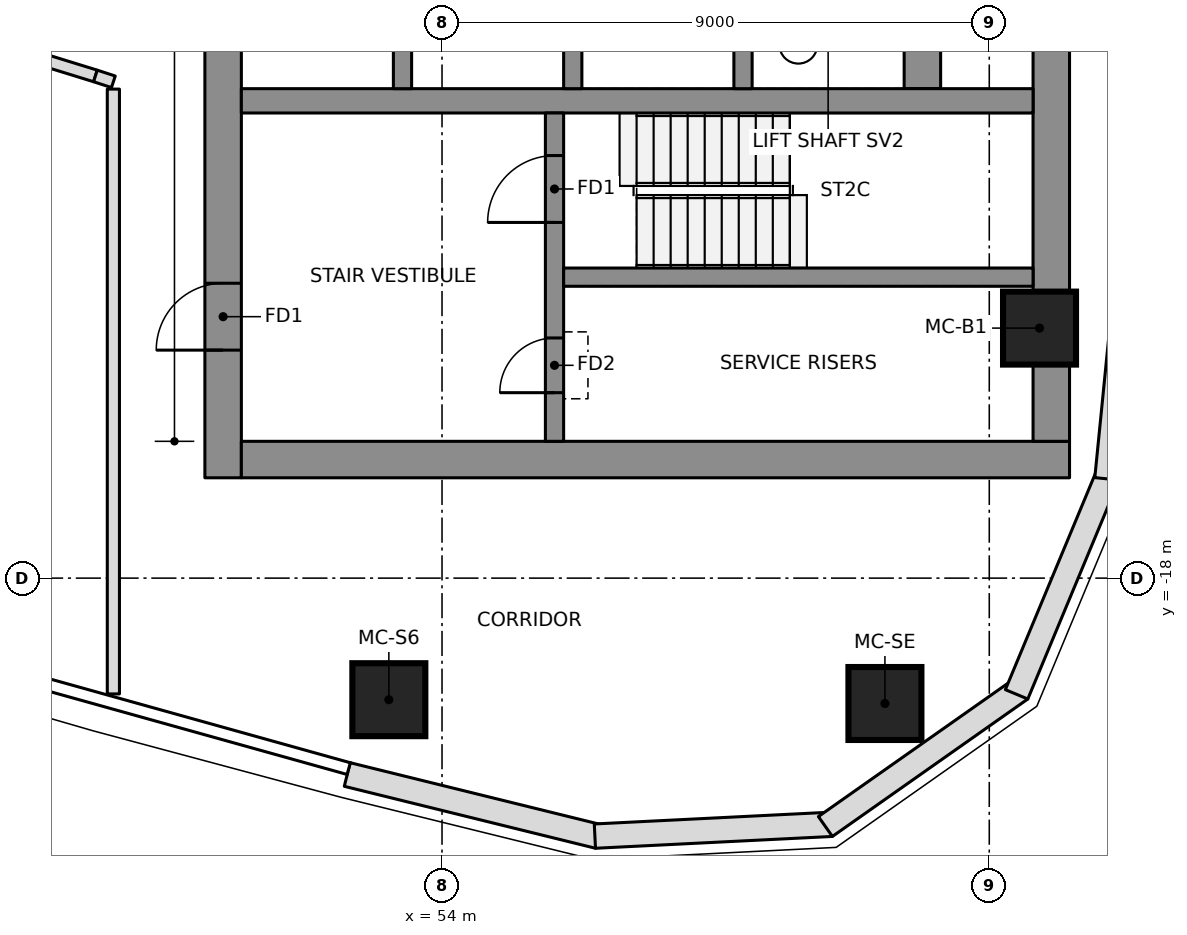
"""IFC4 building model, lengths in metres.
Left out: names, types, materials, properties, quantities, classifications, styles, units other than length and angle.
Written with IfcOpenShell. Run it as: python <this file> out.ifc"""

import sys

from ifc_helpers import new_model, si_unit, direction, frame, frame_2d, origin, origin_2d, place, context, subcontext, project, spatial, polyline, rectangle, outline, extrude, element, fill, save


model = new_model("IFC4")
c1 = context("Model", 3, precision=1e-05, world=origin(), true_north=direction((0.0, 1.0)))
c2 = subcontext(c1, "Body", "Model", "MODEL_VIEW")
j1 = project(units=[si_unit("LENGTHUNIT", "METRE"), si_unit("PLANEANGLEUNIT", "RADIAN")], contexts=[c1])
p1 = place(None, origin())
s1 = spatial("IfcSite", under=j1, at=p1, CompositionType="ELEMENT")
p2 = place(p1, origin())
s2 = spatial("IfcBuilding", under=s1, at=p2, CompositionType="ELEMENT")
p3 = place(p2, frame((0.0, 0.0, 235.0)))
s3 = spatial("IfcBuildingStorey", under=s2, at=p3, CompositionType="ELEMENT", Elevation=235.0)
p4 = place(p3, frame((50.4, -16.35, 0.0), z_axis=(0.0, 0.0, 1.0), x_axis=(0.0, 1.0, 0.0)))
e1 = element("IfcWall", 1, at=p4, inside=s3, PredefinedType="SHEAR", context=c2, shape_type="SweptSolid", body=[
    extrude(rectangle(XDim=9.7, YDim=0.6, at=frame_2d((4.85, 0.0))), origin(), (0.0, 0.0, 1.0), 3.55),
])
p5 = place(p4, frame((2.1, 0.0, 0.0)))
e2 = element("IfcOpeningElement", 2, at=p5, cuts=e1, PredefinedType="OPENING", context=c2, shape_type="SweptSolid", body=[
    extrude(rectangle(XDim=1.1, YDim=2.1, at=frame_2d((0.55, 1.05))), frame((0.0, 0.31, 0.0), z_axis=(0.0, -1.0, 0.0), x_axis=(1.0, 0.0, 0.0)), (0.0, 0.0, 1.0), 0.62),
])
p6 = place(p3, frame((50.7, -16.05, 0.0), z_axis=(0.0, 0.0, 1.0), x_axis=(1.0, 0.0, 0.0)))
e3 = element("IfcWall", 3, at=p6, inside=s3, PredefinedType="SHEAR", context=c2, shape_type="SweptSolid", body=[
    extrude(rectangle(XDim=13.62, YDim=0.6, at=frame_2d((6.81, 0.0))), origin(), (0.0, 0.0, 1.0), 3.55),
])
p7 = place(p3, frame((64.02, -15.75, 0.0), z_axis=(0.0, 0.0, 1.0), x_axis=(0.0, 1.0, 0.0)))
e4 = element("IfcWall", 4, at=p7, inside=s3, PredefinedType="SHEAR", context=c2, shape_type="SweptSolid", body=[
    extrude(rectangle(XDim=8.248, YDim=0.6, at=frame_2d((4.124, 0.0))), origin(), (0.0, 0.0, 1.0), 3.55),
])
p8 = place(p3, frame((61.9, -9.95, 0.0), z_axis=(0.0, 0.0, 1.0), x_axis=(0.0, 1.0, 0.0)))
e5 = element("IfcWall", 5, at=p8, inside=s3, PredefinedType="SHEAR", context=c2, shape_type="SweptSolid", body=[
    extrude(rectangle(XDim=19.9, YDim=0.6, at=frame_2d((9.95, 0.0))), origin(), (0.0, 0.0, 1.0), 3.55),
])
p9 = place(p3, frame((50.7, -10.15, 0.0), z_axis=(0.0, 0.0, 1.0), x_axis=(1.0, 0.0, 0.0)))
e6 = element("IfcWall", 6, at=p9, inside=s3, PredefinedType="SHEAR", context=c2, shape_type="SweptSolid", body=[
    extrude(rectangle(XDim=13.02, YDim=0.4, at=frame_2d((6.51, 0.0))), origin(), (0.0, 0.0, 1.0), 3.55),
])
for number, where, z_axis, x_axis in (
    (7, (53.35, -9.95, 0.0), (0.0, 0.0, 1.0), (0.0, 1.0, 0.0)),
    (8, (56.15, -9.95, 0.0), (0.0, 0.0, 1.0), (0.0, 1.0, 0.0)),
    (9, (58.95, -9.95, 0.0), (0.0, 0.0, 1.0), (0.0, 1.0, 0.0)),
):
    element("IfcWall", number, at=place(p3, frame(where, z_axis=z_axis, x_axis=x_axis)), inside=s3, PredefinedType="SHEAR", context=c2, shape_type="SweptSolid", body=[
        extrude(rectangle(XDim=3.0, YDim=0.3, at=frame_2d((1.5, 0.0))), origin(), (0.0, 0.0, 1.0), 3.55),
    ])
p10 = place(p3, frame((55.85, -15.75, 0.0), z_axis=(0.0, 0.0, 1.0), x_axis=(0.0, 1.0, 0.0)))
e10 = element("IfcWall", 10, at=p10, inside=s3, PredefinedType="SHEAR", context=c2, shape_type="SweptSolid", body=[
    extrude(rectangle(XDim=5.4, YDim=0.3, at=frame_2d((2.7, 0.0))), origin(), (0.0, 0.0, 1.0), 3.55),
])
p11 = place(p10, frame((3.6, 0.0, 0.0)))
e11 = element("IfcOpeningElement", 11, at=p11, cuts=e10, PredefinedType="OPENING", context=c2, shape_type="SweptSolid", body=[
    extrude(rectangle(XDim=1.1, YDim=2.1, at=frame_2d((0.55, 1.05))), frame((0.0, 0.16, 0.0), z_axis=(0.0, -1.0, 0.0), x_axis=(1.0, 0.0, 0.0)), (0.0, 0.0, 1.0), 0.32),
])
p12 = place(p10, frame((0.8, 0.0, 0.0)))
e12 = element("IfcOpeningElement", 12, at=p12, cuts=e10, PredefinedType="OPENING", context=c2, shape_type="SweptSolid", body=[
    extrude(rectangle(XDim=0.9, YDim=2.1, at=frame_2d((0.45, 1.05))), frame((0.0, 0.16, 0.0), z_axis=(0.0, -1.0, 0.0), x_axis=(1.0, 0.0, 0.0)), (0.0, 0.0, 1.0), 0.32),
])
p13 = place(p3, frame((56.0, -13.05, 0.0), z_axis=(0.0, 0.0, 1.0), x_axis=(1.0, 0.0, 0.0)))
e13 = element("IfcWall", 13, at=p13, inside=s3, PredefinedType="SHEAR", context=c2, shape_type="SweptSolid", body=[
    extrude(rectangle(XDim=7.72, YDim=0.3, at=frame_2d((3.86, 0.0))), origin(), (0.0, 0.0, 1.0), 3.55),
])
for number, where, z_axis, x_axis in (
    (14, (53.125, -20.0, 0.0), (0.0, 0.0, 1.0), (1.0, 0.0, 0.0)),
    (15, (61.284, -20.062, 0.0), (0.0, 0.0, 1.0), (1.0, 0.0, 0.0)),
    (16, (63.826, -13.888, 0.0), (0.0, 0.0, 1.0), (1.0, 0.0, 0.0)),
):
    element("IfcColumn", number, at=place(p3, frame(where, z_axis=z_axis, x_axis=x_axis)), inside=s3, PredefinedType="COLUMN", context=c2, shape_type="SweptSolid", body=[
        extrude(rectangle(XDim=1.2, YDim=1.2, at=origin_2d()), origin(), (0.0, 0.0, 1.0), 3.55),
    ])
p14 = place(p3, frame((52.441, -21.23, 0.0), z_axis=(0.0, 0.0, 1.0), x_axis=(0.970902342456, -0.23947576373, 0.0)))
e17 = element("IfcWall", 17, at=p14, inside=s3, PredefinedType="NOTDEFINED", context=c2, shape_type="SweptSolid", body=[
    extrude(outline(polyline([(0.0, -0.2), (4.255, -0.2), (4.197, 0.2), (0.0, 0.2), (0.0, -0.2)])), origin(), (0.0, 0.0, 1.0), 3.25),
])
p15 = place(p3, frame((56.543, -22.242, 0.0), z_axis=(0.0, 0.0, 1.0), x_axis=(0.998758875872, 0.049806705046, 0.0)))
e18 = element("IfcWall", 18, at=p15, inside=s3, PredefinedType="NOTDEFINED", context=c2, shape_type="SweptSolid", body=[
    extrude(outline(polyline([(-0.029, -0.2), (3.871, -0.2), (3.756, 0.2), (0.029, 0.2), (-0.029, -0.2)])), origin(), (0.0, 0.0, 1.0), 3.25),
])
p16 = place(p3, frame((60.352, -22.052, 0.0), z_axis=(0.0, 0.0, 1.0), x_axis=(0.817942545532, 0.575299915009, 0.0)))
e19 = element("IfcWall", 19, at=p16, inside=s3, PredefinedType="NOTDEFINED", context=c2, shape_type="SweptSolid", body=[
    extrude(outline(polyline([(-0.058, -0.2), (3.871, -0.2), (3.756, 0.2), (0.058, 0.2), (-0.058, -0.2)])), origin(), (0.0, 0.0, 1.0), 3.25),
])
p17 = place(p3, frame((63.471, -19.858, 0.0), z_axis=(0.0, 0.0, 1.0), x_axis=(0.3844335483, 0.923152667191, 0.0)))
e20 = element("IfcWall", 20, at=p17, inside=s3, PredefinedType="NOTDEFINED", context=c2, shape_type="SweptSolid", body=[
    extrude(outline(polyline([(-0.058, -0.2), (3.843, -0.2), (3.784, 0.2), (0.058, 0.2), (-0.058, -0.2)])), origin(), (0.0, 0.0, 1.0), 3.25),
])
p18 = place(p3, frame((64.938, -16.337, 0.0), z_axis=(0.0, 0.0, 1.0), x_axis=(0.098718218066, 0.995115427185, 0.0)))
e21 = element("IfcWall", 21, at=p18, inside=s3, PredefinedType="NOTDEFINED", context=c2, shape_type="SweptSolid", body=[
    extrude(outline(polyline([(-0.03, -0.2), (4.096, -0.2), (4.09, 0.2), (0.03, 0.2), (-0.03, -0.2)])), origin(), (0.0, 0.0, 1.0), 3.25),
])
p19 = place(p3, frame((41.898, -7.764, 0.0), z_axis=(0.0, 0.0, 1.0), x_axis=(0.955502033518, -0.294984514752, 0.0)))
e22 = element("IfcWall", 22, at=p19, inside=s3, PredefinedType="PARTITIONING", context=c2, shape_type="SweptSolid", body=[
    extrude(rectangle(XDim=6.7, YDim=0.2, at=frame_2d((3.35, 0.0))), origin(), (0.0, 0.0, 1.0), 3.25),
])
p20 = place(p19, frame((3.95, 0.0, 0.0)))
e23 = element("IfcOpeningElement", 23, at=p20, cuts=e22, PredefinedType="OPENING", context=c2, shape_type="SweptSolid", body=[
    extrude(rectangle(XDim=1.5, YDim=2.1, at=frame_2d((0.75, 1.05))), frame((0.0, 0.11, 0.0), z_axis=(0.0, -1.0, 0.0), x_axis=(1.0, 0.0, 0.0)), (0.0, 0.0, 1.0), 0.22),
])
p21 = place(p3, frame((48.3, -9.741, 0.0), z_axis=(0.0, 0.0, 1.0), x_axis=(0.950709666312, -0.31008245739, 0.0)))
e24 = element("IfcWall", 24, at=p21, inside=s3, PredefinedType="PARTITIONING", context=c2, shape_type="SweptSolid", body=[
    extrude(rectangle(XDim=0.31, YDim=0.2, at=frame_2d((0.155, 0.0))), origin(), (0.0, 0.0, 1.0), 3.25),
])
p22 = place(p3, frame((48.595, -9.957, 0.0), z_axis=(0.0, 0.0, 1.0), x_axis=(0.0, -1.0, 0.0)))
e25 = element("IfcWall", 25, at=p22, inside=s3, PredefinedType="PARTITIONING", context=c2, shape_type="SweptSolid", body=[
    extrude(rectangle(XDim=9.947, YDim=0.2, at=frame_2d((4.974, 0.0))), origin(), (0.0, 0.0, 1.0), 3.25),
])
p23 = place(p11, origin())
e26 = element("IfcDoor", 26, at=p23, inside=s3, OperationType="SINGLE_SWING_RIGHT", PredefinedType="DOOR", context=c2, shape_type="SweptSolid", body=[
    extrude(rectangle(XDim=1.1, YDim=2.1, at=frame_2d((0.55, 1.05))), frame((0.0, 0.025, 0.0), z_axis=(0.0, -1.0, 0.0), x_axis=(1.0, 0.0, 0.0)), (0.0, 0.0, 1.0), 0.05),
])
fill(e11, e26)
p24 = place(p5, origin())
e27 = element("IfcDoor", 27, at=p24, inside=s3, OperationType="SINGLE_SWING_RIGHT", PredefinedType="DOOR", context=c2, shape_type="SweptSolid", body=[
    extrude(rectangle(XDim=1.1, YDim=2.1, at=frame_2d((0.55, 1.05))), frame((0.0, 0.025, 0.0), z_axis=(0.0, -1.0, 0.0), x_axis=(1.0, 0.0, 0.0)), (0.0, 0.0, 1.0), 0.05),
])
fill(e2, e27)
p25 = place(p12, origin())
e28 = element("IfcDoor", 28, at=p25, inside=s3, OperationType="SINGLE_SWING_LEFT", PredefinedType="DOOR", context=c2, shape_type="SweptSolid", body=[
    extrude(rectangle(XDim=0.9, YDim=2.1, at=frame_2d((0.45, 1.05))), frame((0.0, 0.025, 0.0), z_axis=(0.0, -1.0, 0.0), x_axis=(1.0, 0.0, 0.0)), (0.0, 0.0, 1.0), 0.05),
])
fill(e12, e28)
save(model, sys.argv[1])
